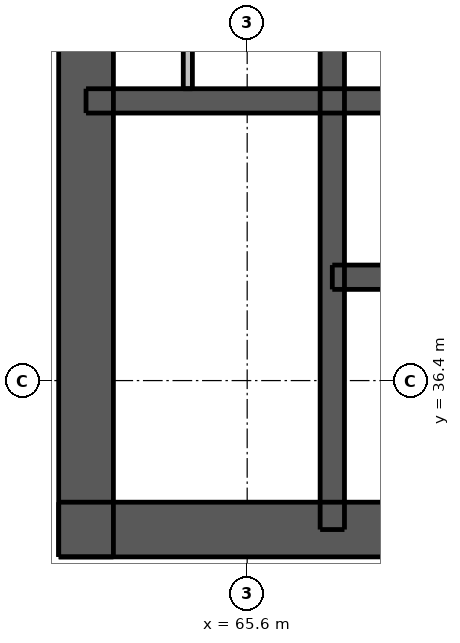
"""IFC4 building model, lengths in metres.
Left out: names, types, materials, properties, quantities, classifications, styles, units other than length and angle.
Written with IfcOpenShell. Run it as: python <this file> out.ifc"""

import sys

from ifc_helpers import new_model, si_unit, direction, frame, frame_2d, origin, place, context, subcontext, project, spatial, rectangle, extrude, element, fill, save


model = new_model("IFC4")
c1 = context("Model", 3, precision=1e-05, world=origin(), true_north=direction((0.0, 1.0)))
c2 = subcontext(c1, "Body", "Model", "MODEL_VIEW")
j1 = project(units=[si_unit("LENGTHUNIT", "METRE"), si_unit("PLANEANGLEUNIT", "RADIAN")], contexts=[c1])
p1 = place(None, origin())
s1 = spatial("IfcSite", under=j1, at=p1, CompositionType="ELEMENT")
p2 = place(p1, origin())
s2 = spatial("IfcBuilding", under=s1, at=p2, CompositionType="ELEMENT")
p3 = place(p2, frame((0.0, 0.0, 66.4)))
s3 = spatial("IfcBuildingStorey", under=s2, at=p3, CompositionType="ELEMENT", Elevation=66.4)
p4 = place(p3, frame((62.5, 33.95, 0.0), z_axis=(0.0, 0.0, 1.0), x_axis=(1.0, 0.0, 0.0)))
e1 = element("IfcWall", 1, at=p4, inside=s3, PredefinedType="SHEAR", context=c2, shape_type="SweptSolid", body=[
    extrude(rectangle(XDim=24.0, YDim=0.9, at=frame_2d((12.0, 0.0))), origin(), (0.0, 0.0, 1.0), 2.95),
])
p5 = place(p4, frame((2.05, 0.0, 0.0)))
e2 = element("IfcOpeningElement", 2, at=p5, cuts=e1, PredefinedType="OPENING", context=c2, shape_type="SweptSolid", body=[
    extrude(rectangle(XDim=1.1, YDim=2.1, at=frame_2d((0.55, 1.05))), frame((0.0, 0.46, 0.0), z_axis=(0.0, -1.0, 0.0), x_axis=(1.0, 0.0, 0.0)), (0.0, 0.0, 1.0), 0.92),
])
p6 = place(p4, frame((20.85, 0.0, 0.0)))
e3 = element("IfcOpeningElement", 3, at=p6, cuts=e1, PredefinedType="OPENING", context=c2, shape_type="SweptSolid", body=[
    extrude(rectangle(XDim=1.1, YDim=2.1, at=frame_2d((0.55, 1.05))), frame((0.0, 0.46, 0.0), z_axis=(0.0, -1.0, 0.0), x_axis=(1.0, 0.0, 0.0)), (0.0, 0.0, 1.0), 0.92),
])
p7 = place(p4, frame((8.0, 0.0, 0.0)))
e4 = element("IfcOpeningElement", 4, at=p7, cuts=e1, PredefinedType="OPENING", context=c2, shape_type="SweptSolid", body=[
    extrude(rectangle(XDim=1.1, YDim=2.1, at=frame_2d((0.55, 1.05))), frame((0.0, 0.46, 0.0), z_axis=(0.0, -1.0, 0.0), x_axis=(1.0, 0.0, 0.0)), (0.0, 0.0, 1.0), 0.92),
])
p8 = place(p4, frame((15.3, 0.0, 0.0)))
e5 = element("IfcOpeningElement", 5, at=p8, cuts=e1, PredefinedType="OPENING", context=c2, shape_type="SweptSolid", body=[
    extrude(rectangle(XDim=0.9, YDim=2.1, at=frame_2d((0.45, 1.05))), frame((0.0, 0.46, 0.0), z_axis=(0.0, -1.0, 0.0), x_axis=(1.0, 0.0, 0.0)), (0.0, 0.0, 1.0), 0.92),
])
p9 = place(p3, frame((62.95, 33.5, 0.0), z_axis=(0.0, 0.0, 1.0), x_axis=(0.0, 1.0, 0.0)))
e6 = element("IfcWall", 6, at=p9, inside=s3, PredefinedType="SHEAR", context=c2, shape_type="SweptSolid", body=[
    extrude(rectangle(XDim=24.0, YDim=0.9, at=frame_2d((12.0, 0.0))), origin(), (0.0, 0.0, 1.0), 2.95),
])
p10 = place(p9, frame((11.2, 0.0, 0.0)))
e7 = element("IfcOpeningElement", 7, at=p10, cuts=e6, PredefinedType="OPENING", context=c2, shape_type="SweptSolid", body=[
    extrude(rectangle(XDim=1.6, YDim=2.1, at=frame_2d((0.8, 1.05))), frame((0.0, 0.46, 0.0), z_axis=(0.0, -1.0, 0.0), x_axis=(1.0, 0.0, 0.0)), (0.0, 0.0, 1.0), 0.92),
])
p11 = place(p3, frame((62.95, 41.0, 0.0), z_axis=(0.0, 0.0, 1.0), x_axis=(1.0, 0.0, 0.0)))
e8 = element("IfcWall", 8, at=p11, inside=s3, PredefinedType="SHEAR", context=c2, shape_type="SweptSolid", body=[
    extrude(rectangle(XDim=23.1, YDim=0.4, at=frame_2d((11.55, 0.0))), origin(), (0.0, 0.0, 1.0), 2.95),
])
p12 = place(p3, frame((67.0, 33.95, 0.0), z_axis=(0.0, 0.0, 1.0), x_axis=(0.0, 1.0, 0.0)))
e9 = element("IfcWall", 9, at=p12, inside=s3, PredefinedType="SHEAR", context=c2, shape_type="SweptSolid", body=[
    extrude(rectangle(XDim=9.95, YDim=0.4, at=frame_2d((4.975, 0.0))), origin(), (0.0, 0.0, 1.0), 2.95),
])
p13 = place(p12, frame((0.65, 0.0, 0.0)))
e10 = element("IfcOpeningElement", 10, at=p13, cuts=e9, PredefinedType="OPENING", context=c2, shape_type="SweptSolid", body=[
    extrude(rectangle(XDim=1.1, YDim=2.1, at=frame_2d((0.55, 1.05))), frame((0.0, 0.21, 0.0), z_axis=(0.0, -1.0, 0.0), x_axis=(1.0, 0.0, 0.0)), (0.0, 0.0, 1.0), 0.42),
])
p14 = place(p3, frame((67.0, 38.1, 0.0), z_axis=(0.0, 0.0, 1.0), x_axis=(1.0, 0.0, 0.0)))
e11 = element("IfcWall", 11, at=p14, inside=s3, PredefinedType="SHEAR", context=c2, shape_type="SweptSolid", body=[
    extrude(rectangle(XDim=7.5, YDim=0.4, at=frame_2d((3.75, 0.0))), origin(), (0.0, 0.0, 1.0), 2.95),
])
p15 = place(p14, frame((0.7, 0.0, 0.0)))
e12 = element("IfcOpeningElement", 12, at=p15, cuts=e11, PredefinedType="OPENING", context=c2, shape_type="SweptSolid", body=[
    extrude(rectangle(XDim=1.1, YDim=2.1, at=frame_2d((0.55, 1.05))), frame((0.0, 0.21, 0.0), z_axis=(0.0, -1.0, 0.0), x_axis=(1.0, 0.0, 0.0)), (0.0, 0.0, 1.0), 0.42),
])
p16 = place(p14, frame((3.2, 0.0, 0.0)))
e13 = element("IfcOpeningElement", 13, at=p16, cuts=e11, PredefinedType="OPENING", context=c2, shape_type="SweptSolid", body=[
    extrude(rectangle(XDim=1.1, YDim=2.1, at=frame_2d((0.55, 1.05))), frame((0.0, 0.21, 0.0), z_axis=(0.0, -1.0, 0.0), x_axis=(1.0, 0.0, 0.0)), (0.0, 0.0, 1.0), 0.42),
])
p17 = place(p14, frame((5.65, 0.0, 0.0)))
e14 = element("IfcOpeningElement", 14, at=p17, cuts=e11, PredefinedType="OPENING", context=c2, shape_type="SweptSolid", body=[
    extrude(rectangle(XDim=1.2, YDim=2.1, at=frame_2d((0.6, 1.05))), frame((0.0, 0.21, 0.0), z_axis=(0.0, -1.0, 0.0), x_axis=(1.0, 0.0, 0.0)), (0.0, 0.0, 1.0), 0.42),
])
p18 = place(p3, frame((64.624, 41.2, 0.0), z_axis=(0.0, 0.0, 1.0), x_axis=(0.0, 1.0, 0.0)))
e15 = element("IfcWall", 15, at=p18, inside=s3, PredefinedType="PLUMBINGWALL", context=c2, shape_type="SweptSolid", body=[
    extrude(rectangle(XDim=2.5, YDim=0.15, at=frame_2d((1.25, 0.0))), origin(), (0.0, 0.0, 1.0), 2.95),
])
p19 = place(p5, origin())
e16 = element("IfcDoor", 16, at=p19, inside=s3, OperationType="SINGLE_SWING_LEFT", PredefinedType="DOOR", context=c2, shape_type="SweptSolid", body=[
    extrude(rectangle(XDim=1.1, YDim=2.1, at=frame_2d((0.55, 1.05))), frame((0.0, 0.438, 0.0), z_axis=(0.0, -1.0, 0.0), x_axis=(1.0, 0.0, 0.0)), (0.0, 0.0, 1.0), 0.05),
])
fill(e2, e16)
p20 = place(p13, origin())
e17 = element("IfcDoor", 17, at=p20, inside=s3, OperationType="SINGLE_SWING_RIGHT", PredefinedType="DOOR", context=c2, shape_type="SweptSolid", body=[
    extrude(rectangle(XDim=1.1, YDim=2.1, at=frame_2d((0.55, 1.05))), frame((0.0, -0.138, 0.0), z_axis=(0.0, -1.0, 0.0), x_axis=(1.0, 0.0, 0.0)), (0.0, 0.0, 1.0), 0.05),
])
fill(e10, e17)
p21 = place(p15, origin())
e18 = element("IfcDoor", 18, at=p21, inside=s3, OperationType="DOUBLE_DOOR_SLIDING", PredefinedType="DOOR", context=c2, shape_type="SweptSolid", body=[
    extrude(rectangle(XDim=1.1, YDim=2.1, at=frame_2d((0.55, 1.05))), frame((0.0, 0.025, 0.0), z_axis=(0.0, -1.0, 0.0), x_axis=(1.0, 0.0, 0.0)), (0.0, 0.0, 1.0), 0.05),
])
fill(e12, e18)
save(model, sys.argv[1])
